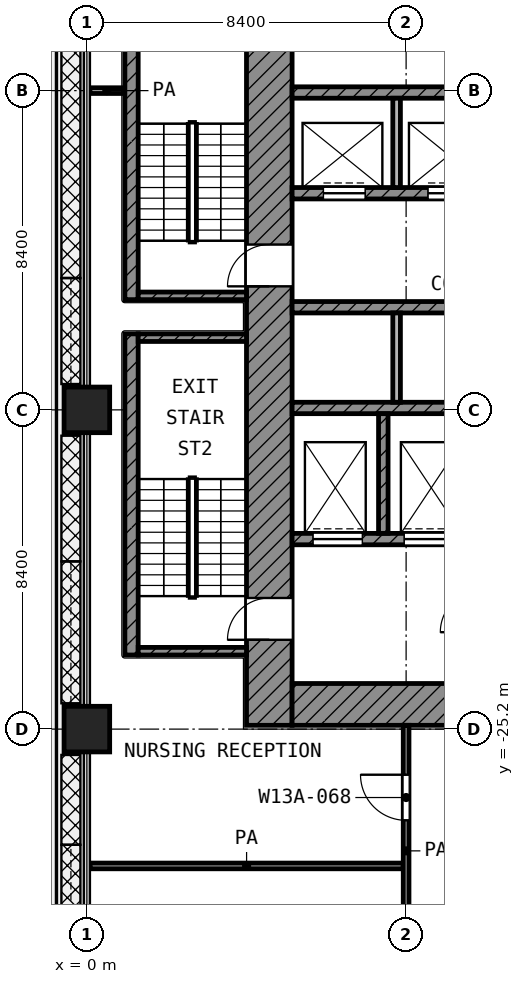
"""IFC4 building model, lengths in metres.
Left out: names, types, materials, properties, quantities, classifications, styles, units other than length and angle.
Written with IfcOpenShell. Run it as: python <this file> out.ifc"""

import sys

from ifc_helpers import new_model, si_unit, direction, frame, frame_2d, origin, origin_2d, place, context, subcontext, project, spatial, rectangle, extrude, element, fill, save


model = new_model("IFC4")
c1 = context("Model", 3, precision=1e-05, world=origin(), true_north=direction((0.0, 1.0)))
c2 = subcontext(c1, "Body", "Model", "MODEL_VIEW")
j1 = project(units=[si_unit("LENGTHUNIT", "METRE"), si_unit("PLANEANGLEUNIT", "RADIAN")], contexts=[c1])
p1 = place(None, origin())
s1 = spatial("IfcSite", under=j1, at=p1, CompositionType="ELEMENT")
p2 = place(p1, origin())
s2 = spatial("IfcBuilding", under=s1, at=p2, CompositionType="ELEMENT")
p3 = place(p2, frame((0.0, 0.0, 60.2)))
s3 = spatial("IfcBuildingStorey", under=s2, at=p3, CompositionType="ELEMENT", Elevation=60.2)
for number, where, z_axis, x_axis in (
    (1, (0.0, -16.8, 0.0), (0.0, 0.0, 1.0), (1.0, 0.0, 0.0)),
    (2, (0.0, -25.2, 0.0), (0.0, 0.0, 1.0), (1.0, 0.0, 0.0)),
):
    element("IfcColumn", number, at=place(p3, frame(where, z_axis=z_axis, x_axis=x_axis)), inside=s3, PredefinedType="COLUMN", context=c2, shape_type="SweptSolid", body=[
        extrude(rectangle(XDim=1.2, YDim=1.2, at=origin_2d()), origin(), (0.0, 0.0, 1.0), 4.2),
    ])
p4 = place(p3, frame((4.8, -25.1, 0.0), z_axis=(0.0, 0.0, 1.0), x_axis=(0.0, 1.0, 0.0)))
e3 = element("IfcWall", 3, at=p4, inside=s3, PredefinedType="SHEAR", context=c2, shape_type="SweptSolid", body=[
    extrude(rectangle(XDim=19.7, YDim=1.2, at=frame_2d((9.85, 0.0))), origin(), (0.0, 0.0, 1.0), 3.9),
])
p5 = place(p4, frame((11.55, 0.0, 0.0)))
e4 = element("IfcOpeningElement", 4, at=p5, cuts=e3, PredefinedType="OPENING", context=c2, shape_type="SweptSolid", body=[
    extrude(rectangle(XDim=1.1, YDim=2.1, at=frame_2d((0.55, 1.05))), frame((0.0, 0.61, 0.0), z_axis=(0.0, -1.0, 0.0), x_axis=(1.0, 0.0, 0.0)), (0.0, 0.0, 1.0), 1.22),
])
p6 = place(p4, frame((2.25, 0.0, 0.0)))
e5 = element("IfcOpeningElement", 5, at=p6, cuts=e3, PredefinedType="OPENING", context=c2, shape_type="SweptSolid", body=[
    extrude(rectangle(XDim=1.1, YDim=2.1, at=frame_2d((0.55, 1.05))), frame((0.0, 0.61, 0.0), z_axis=(0.0, -1.0, 0.0), x_axis=(1.0, 0.0, 0.0)), (0.0, 0.0, 1.0), 1.22),
])
p7 = place(p3, frame((5.4, -24.55, 0.0), z_axis=(0.0, 0.0, 1.0), x_axis=(1.0, 0.0, 0.0)))
e6 = element("IfcWall", 6, at=p7, inside=s3, PredefinedType="SHEAR", context=c2, shape_type="SweptSolid", body=[
    extrude(rectangle(XDim=18.6, YDim=1.1, at=frame_2d((9.3, 0.0))), origin(), (0.0, 0.0, 1.0), 3.9),
])
p8 = place(p7, frame((6.3, 0.0, 0.0)))
e7 = element("IfcOpeningElement", 7, at=p8, cuts=e6, PredefinedType="OPENING", context=c2, shape_type="SweptSolid", body=[
    extrude(rectangle(XDim=1.8, YDim=2.1, at=frame_2d((0.9, 1.05))), frame((0.0, 0.56, 0.0), z_axis=(0.0, -1.0, 0.0), x_axis=(1.0, 0.0, 0.0)), (0.0, 0.0, 1.0), 1.12),
])
p9 = place(p3, frame((5.4, -8.45, 0.0), z_axis=(0.0, 0.0, 1.0), x_axis=(1.0, 0.0, 0.0)))
e8 = element("IfcWall", 8, at=p9, inside=s3, PredefinedType="SHEAR", context=c2, shape_type="SweptSolid", body=[
    extrude(rectangle(XDim=16.65, YDim=0.3, at=frame_2d((8.325, 0.0))), origin(), (0.0, 0.0, 1.0), 3.9),
])
p10 = place(p3, frame((5.4, -11.1, 0.0), z_axis=(0.0, 0.0, 1.0), x_axis=(1.0, 0.0, 0.0)))
e9 = element("IfcWall", 9, at=p10, inside=s3, PredefinedType="SHEAR", context=c2, shape_type="SweptSolid", body=[
    extrude(rectangle(XDim=16.65, YDim=0.3, at=frame_2d((8.325, 0.0))), origin(), (0.0, 0.0, 1.0), 3.9),
])
p11 = place(p10, frame((0.825, 0.0, 0.0)))
e10 = element("IfcOpeningElement", 10, at=p11, cuts=e9, PredefinedType="OPENING", context=c2, shape_type="SweptSolid", body=[
    extrude(rectangle(XDim=1.1, YDim=2.1, at=frame_2d((0.55, 1.05))), frame((0.0, 0.16, 0.0), z_axis=(0.0, -1.0, 0.0), x_axis=(1.0, 0.0, 0.0)), (0.0, 0.0, 1.0), 0.32),
])
p12 = place(p10, frame((3.575, 0.0, 0.0)))
e11 = element("IfcOpeningElement", 11, at=p12, cuts=e9, PredefinedType="OPENING", context=c2, shape_type="SweptSolid", body=[
    extrude(rectangle(XDim=1.1, YDim=2.1, at=frame_2d((0.55, 1.05))), frame((0.0, 0.16, 0.0), z_axis=(0.0, -1.0, 0.0), x_axis=(1.0, 0.0, 0.0)), (0.0, 0.0, 1.0), 0.32),
])
p13 = place(p10, frame((6.325, 0.0, 0.0)))
e12 = element("IfcOpeningElement", 12, at=p13, cuts=e9, PredefinedType="OPENING", context=c2, shape_type="SweptSolid", body=[
    extrude(rectangle(XDim=1.1, YDim=2.1, at=frame_2d((0.55, 1.05))), frame((0.0, 0.16, 0.0), z_axis=(0.0, -1.0, 0.0), x_axis=(1.0, 0.0, 0.0)), (0.0, 0.0, 1.0), 0.32),
])
p14 = place(p10, frame((9.075, 0.0, 0.0)))
e13 = element("IfcOpeningElement", 13, at=p14, cuts=e9, PredefinedType="OPENING", context=c2, shape_type="SweptSolid", body=[
    extrude(rectangle(XDim=1.1, YDim=2.1, at=frame_2d((0.55, 1.05))), frame((0.0, 0.16, 0.0), z_axis=(0.0, -1.0, 0.0), x_axis=(1.0, 0.0, 0.0)), (0.0, 0.0, 1.0), 0.32),
])
for number, where, z_axis, x_axis in (
    (14, (5.4, -14.1, 0.0), (0.0, 0.0, 1.0), (1.0, 0.0, 0.0)),
    (15, (5.4, -16.75, 0.0), (0.0, 0.0, 1.0), (1.0, 0.0, 0.0)),
):
    element("IfcWall", number, at=place(p3, frame(where, z_axis=z_axis, x_axis=x_axis)), inside=s3, PredefinedType="SHEAR", context=c2, shape_type="SweptSolid", body=[
        extrude(rectangle(XDim=16.65, YDim=0.3, at=frame_2d((8.325, 0.0))), origin(), (0.0, 0.0, 1.0), 3.9),
    ])
p15 = place(p3, frame((5.4, -20.2, 0.0), z_axis=(0.0, 0.0, 1.0), x_axis=(1.0, 0.0, 0.0)))
e16 = element("IfcWall", 16, at=p15, inside=s3, PredefinedType="SHEAR", context=c2, shape_type="SweptSolid", body=[
    extrude(rectangle(XDim=14.65, YDim=0.3, at=frame_2d((7.325, 0.0))), origin(), (0.0, 0.0, 1.0), 3.9),
])
p16 = place(p15, frame((10.55, 0.0, 0.0)))
e17 = element("IfcOpeningElement", 17, at=p16, cuts=e16, PredefinedType="OPENING", context=c2, shape_type="SweptSolid", body=[
    extrude(rectangle(XDim=1.3, YDim=2.1, at=frame_2d((0.65, 1.05))), frame((0.0, 0.16, 0.0), z_axis=(0.0, -1.0, 0.0), x_axis=(1.0, 0.0, 0.0)), (0.0, 0.0, 1.0), 0.32),
])
p17 = place(p15, frame((12.95, 0.0, 0.0)))
e18 = element("IfcOpeningElement", 18, at=p17, cuts=e16, PredefinedType="OPENING", context=c2, shape_type="SweptSolid", body=[
    extrude(rectangle(XDim=1.3, YDim=2.1, at=frame_2d((0.65, 1.05))), frame((0.0, 0.16, 0.0), z_axis=(0.0, -1.0, 0.0), x_axis=(1.0, 0.0, 0.0)), (0.0, 0.0, 1.0), 0.32),
])
p18 = place(p15, frame((0.55, 0.0, 0.0)))
e19 = element("IfcOpeningElement", 19, at=p18, cuts=e16, PredefinedType="OPENING", context=c2, shape_type="SweptSolid", body=[
    extrude(rectangle(XDim=1.3, YDim=2.1, at=frame_2d((0.65, 1.05))), frame((0.0, 0.16, 0.0), z_axis=(0.0, -1.0, 0.0), x_axis=(1.0, 0.0, 0.0)), (0.0, 0.0, 1.0), 0.32),
])
p19 = place(p15, frame((2.95, 0.0, 0.0)))
e20 = element("IfcOpeningElement", 20, at=p19, cuts=e16, PredefinedType="OPENING", context=c2, shape_type="SweptSolid", body=[
    extrude(rectangle(XDim=1.3, YDim=2.1, at=frame_2d((0.65, 1.05))), frame((0.0, 0.16, 0.0), z_axis=(0.0, -1.0, 0.0), x_axis=(1.0, 0.0, 0.0)), (0.0, 0.0, 1.0), 0.32),
])
p20 = place(p15, frame((7.15, 0.0, 0.0)))
e21 = element("IfcOpeningElement", 21, at=p20, cuts=e16, PredefinedType="OPENING", context=c2, shape_type="SweptSolid", body=[
    extrude(rectangle(XDim=0.9, YDim=2.1, at=frame_2d((0.45, 1.05))), frame((0.0, 0.16, 0.0), z_axis=(0.0, -1.0, 0.0), x_axis=(1.0, 0.0, 0.0)), (0.0, 0.0, 1.0), 0.32),
])
p21 = place(p3, frame((7.8, -20.05, 0.0), z_axis=(0.0, 0.0, 1.0), x_axis=(0.0, 1.0, 0.0)))
e22 = element("IfcWall", 22, at=p21, inside=s3, PredefinedType="SHEAR", context=c2, shape_type="SweptSolid", body=[
    extrude(rectangle(XDim=3.15, YDim=0.25, at=frame_2d((1.575, 0.0))), origin(), (0.0, 0.0, 1.0), 3.9),
])
p22 = place(p3, frame((8.15, -10.95, 0.0), z_axis=(0.0, 0.0, 1.0), x_axis=(0.0, 1.0, 0.0)))
e23 = element("IfcWall", 23, at=p22, inside=s3, PredefinedType="PARTITIONING", context=c2, shape_type="SweptSolid", body=[
    extrude(rectangle(XDim=2.35, YDim=0.2, at=frame_2d((1.175, 0.0))), origin(), (0.0, 0.0, 1.0), 3.9),
])
p23 = place(p3, frame((8.15, -16.6, 0.0), z_axis=(0.0, 0.0, 1.0), x_axis=(0.0, 1.0, 0.0)))
e24 = element("IfcWall", 24, at=p23, inside=s3, PredefinedType="PARTITIONING", context=c2, shape_type="SweptSolid", body=[
    extrude(rectangle(XDim=2.35, YDim=0.2, at=frame_2d((1.175, 0.0))), origin(), (0.0, 0.0, 1.0), 3.9),
])
p24 = place(p3, frame((1.175, -13.9, 0.0), z_axis=(0.0, 0.0, 1.0), x_axis=(0.0, 1.0, 0.0)))
e25 = element("IfcWall", 25, at=p24, inside=s3, PredefinedType="SHEAR", context=c2, shape_type="SweptSolid", body=[
    extrude(rectangle(XDim=8.45, YDim=0.35, at=frame_2d((4.225, 0.0))), origin(), (0.0, 0.0, 1.0), 3.9),
])
p25 = place(p3, frame((1.35, -13.8, 0.0), z_axis=(0.0, 0.0, 1.0), x_axis=(1.0, 0.0, 0.0)))
e26 = element("IfcWall", 26, at=p25, inside=s3, PredefinedType="SHEAR", context=c2, shape_type="SweptSolid", body=[
    extrude(rectangle(XDim=2.85, YDim=0.2, at=frame_2d((1.425, 0.0))), origin(), (0.0, 0.0, 1.0), 3.9),
])
p26 = place(p3, frame((1.175, -23.25, 0.0), z_axis=(0.0, 0.0, 1.0), x_axis=(0.0, 1.0, 0.0)))
e27 = element("IfcWall", 27, at=p26, inside=s3, PredefinedType="SHEAR", context=c2, shape_type="SweptSolid", body=[
    extrude(rectangle(XDim=8.45, YDim=0.35, at=frame_2d((4.225, 0.0))), origin(), (0.0, 0.0, 1.0), 3.9),
])
for number, where, z_axis, x_axis in (
    (28, (1.35, -14.9, 0.0), (0.0, 0.0, 1.0), (1.0, 0.0, 0.0)),
    (29, (1.35, -23.15, 0.0), (0.0, 0.0, 1.0), (1.0, 0.0, 0.0)),
):
    element("IfcWall", number, at=place(p3, frame(where, z_axis=z_axis, x_axis=x_axis)), inside=s3, PredefinedType="SHEAR", context=c2, shape_type="SweptSolid", body=[
        extrude(rectangle(XDim=2.85, YDim=0.2, at=frame_2d((1.425, 0.0))), origin(), (0.0, 0.0, 1.0), 3.9),
    ])
p27 = place(p3, frame((0.08, -28.8, 0.0), z_axis=(0.0, 0.0, 1.0), x_axis=(1.0, 0.0, 0.0)))
e30 = element("IfcWall", 30, at=p27, inside=s3, PredefinedType="PARTITIONING", context=c2, shape_type="SweptSolid", body=[
    extrude(rectangle(XDim=8.245, YDim=0.15, at=frame_2d((4.123, 0.0))), origin(), (0.0, 0.0, 1.0), 3.9),
])
p28 = place(p3, frame((0.08, -8.4, 0.0), z_axis=(0.0, 0.0, 1.0), x_axis=(1.0, 0.0, 0.0)))
e31 = element("IfcWall", 31, at=p28, inside=s3, PredefinedType="PARTITIONING", context=c2, shape_type="SweptSolid", body=[
    extrude(rectangle(XDim=0.89, YDim=0.15, at=frame_2d((0.445, 0.0))), origin(), (0.0, 0.0, 1.0), 3.9),
])
p29 = place(p3, frame((8.4, -31.707, 0.0), z_axis=(0.0, 0.0, 1.0), x_axis=(0.0, 1.0, 0.0)))
e32 = element("IfcWall", 32, at=p29, inside=s3, PredefinedType="PARTITIONING", context=c2, shape_type="SweptSolid", body=[
    extrude(rectangle(XDim=6.607, YDim=0.15, at=frame_2d((3.303, 0.0))), origin(), (0.0, 0.0, 1.0), 3.9),
])
p30 = place(p29, frame((4.107, 0.0, 0.0)))
e33 = element("IfcOpeningElement", 33, at=p30, cuts=e32, PredefinedType="OPENING", context=c2, shape_type="SweptSolid", body=[
    extrude(rectangle(XDim=1.2, YDim=2.1, at=frame_2d((0.6, 1.05))), frame((0.0, 0.085, 0.0), z_axis=(0.0, -1.0, 0.0), x_axis=(1.0, 0.0, 0.0)), (0.0, 0.0, 1.0), 0.17),
])
p31 = place(p11, origin())
e34 = element("IfcDoor", 34, at=p31, inside=s3, OperationType="DOUBLE_DOOR_SLIDING", PredefinedType="DOOR", context=c2, shape_type="SweptSolid", body=[
    extrude(rectangle(XDim=1.1, YDim=2.1, at=frame_2d((0.55, 1.05))), frame((0.0, 0.025, 0.0), z_axis=(0.0, -1.0, 0.0), x_axis=(1.0, 0.0, 0.0)), (0.0, 0.0, 1.0), 0.05),
])
fill(e10, e34)
p32 = place(p12, origin())
e35 = element("IfcDoor", 35, at=p32, inside=s3, OperationType="DOUBLE_DOOR_SLIDING", PredefinedType="DOOR", context=c2, shape_type="SweptSolid", body=[
    extrude(rectangle(XDim=1.1, YDim=2.1, at=frame_2d((0.55, 1.05))), frame((0.0, 0.025, 0.0), z_axis=(0.0, -1.0, 0.0), x_axis=(1.0, 0.0, 0.0)), (0.0, 0.0, 1.0), 0.05),
])
fill(e11, e35)
p33 = place(p18, origin())
e36 = element("IfcDoor", 36, at=p33, inside=s3, OperationType="DOUBLE_DOOR_SLIDING", PredefinedType="DOOR", context=c2, shape_type="SweptSolid", body=[
    extrude(rectangle(XDim=1.3, YDim=2.1, at=frame_2d((0.65, 1.05))), frame((0.0, 0.025, 0.0), z_axis=(0.0, -1.0, 0.0), x_axis=(1.0, 0.0, 0.0)), (0.0, 0.0, 1.0), 0.05),
])
fill(e19, e36)
p34 = place(p19, origin())
e37 = element("IfcDoor", 37, at=p34, inside=s3, OperationType="DOUBLE_DOOR_SLIDING", PredefinedType="DOOR", context=c2, shape_type="SweptSolid", body=[
    extrude(rectangle(XDim=1.3, YDim=2.1, at=frame_2d((0.65, 1.05))), frame((0.0, 0.025, 0.0), z_axis=(0.0, -1.0, 0.0), x_axis=(1.0, 0.0, 0.0)), (0.0, 0.0, 1.0), 0.05),
])
fill(e20, e37)
p35 = place(p5, origin())
e38 = element("IfcDoor", 38, at=p35, inside=s3, OperationType="SINGLE_SWING_LEFT", PredefinedType="DOOR", context=c2, shape_type="SweptSolid", body=[
    extrude(rectangle(XDim=1.1, YDim=2.1, at=frame_2d((0.55, 1.05))), frame((0.0, 0.025, 0.0), z_axis=(0.0, -1.0, 0.0), x_axis=(1.0, 0.0, 0.0)), (0.0, 0.0, 1.0), 0.05),
])
fill(e4, e38)
p36 = place(p6, origin())
e39 = element("IfcDoor", 39, at=p36, inside=s3, OperationType="SINGLE_SWING_LEFT", PredefinedType="DOOR", context=c2, shape_type="SweptSolid", body=[
    extrude(rectangle(XDim=1.1, YDim=2.1, at=frame_2d((0.55, 1.05))), frame((0.0, 0.025, 0.0), z_axis=(0.0, -1.0, 0.0), x_axis=(1.0, 0.0, 0.0)), (0.0, 0.0, 1.0), 0.05),
])
fill(e5, e39)
p37 = place(p30, origin())
e40 = element("IfcDoor", 40, at=p37, inside=s3, OperationType="SINGLE_SWING_RIGHT", PredefinedType="DOOR", context=c2, shape_type="SweptSolid", body=[
    extrude(rectangle(XDim=1.2, YDim=2.1, at=frame_2d((0.6, 1.05))), frame((0.0, 0.025, 0.0), z_axis=(0.0, -1.0, 0.0), x_axis=(1.0, 0.0, 0.0)), (0.0, 0.0, 1.0), 0.05),
])
fill(e33, e40)
save(model, sys.argv[1])
